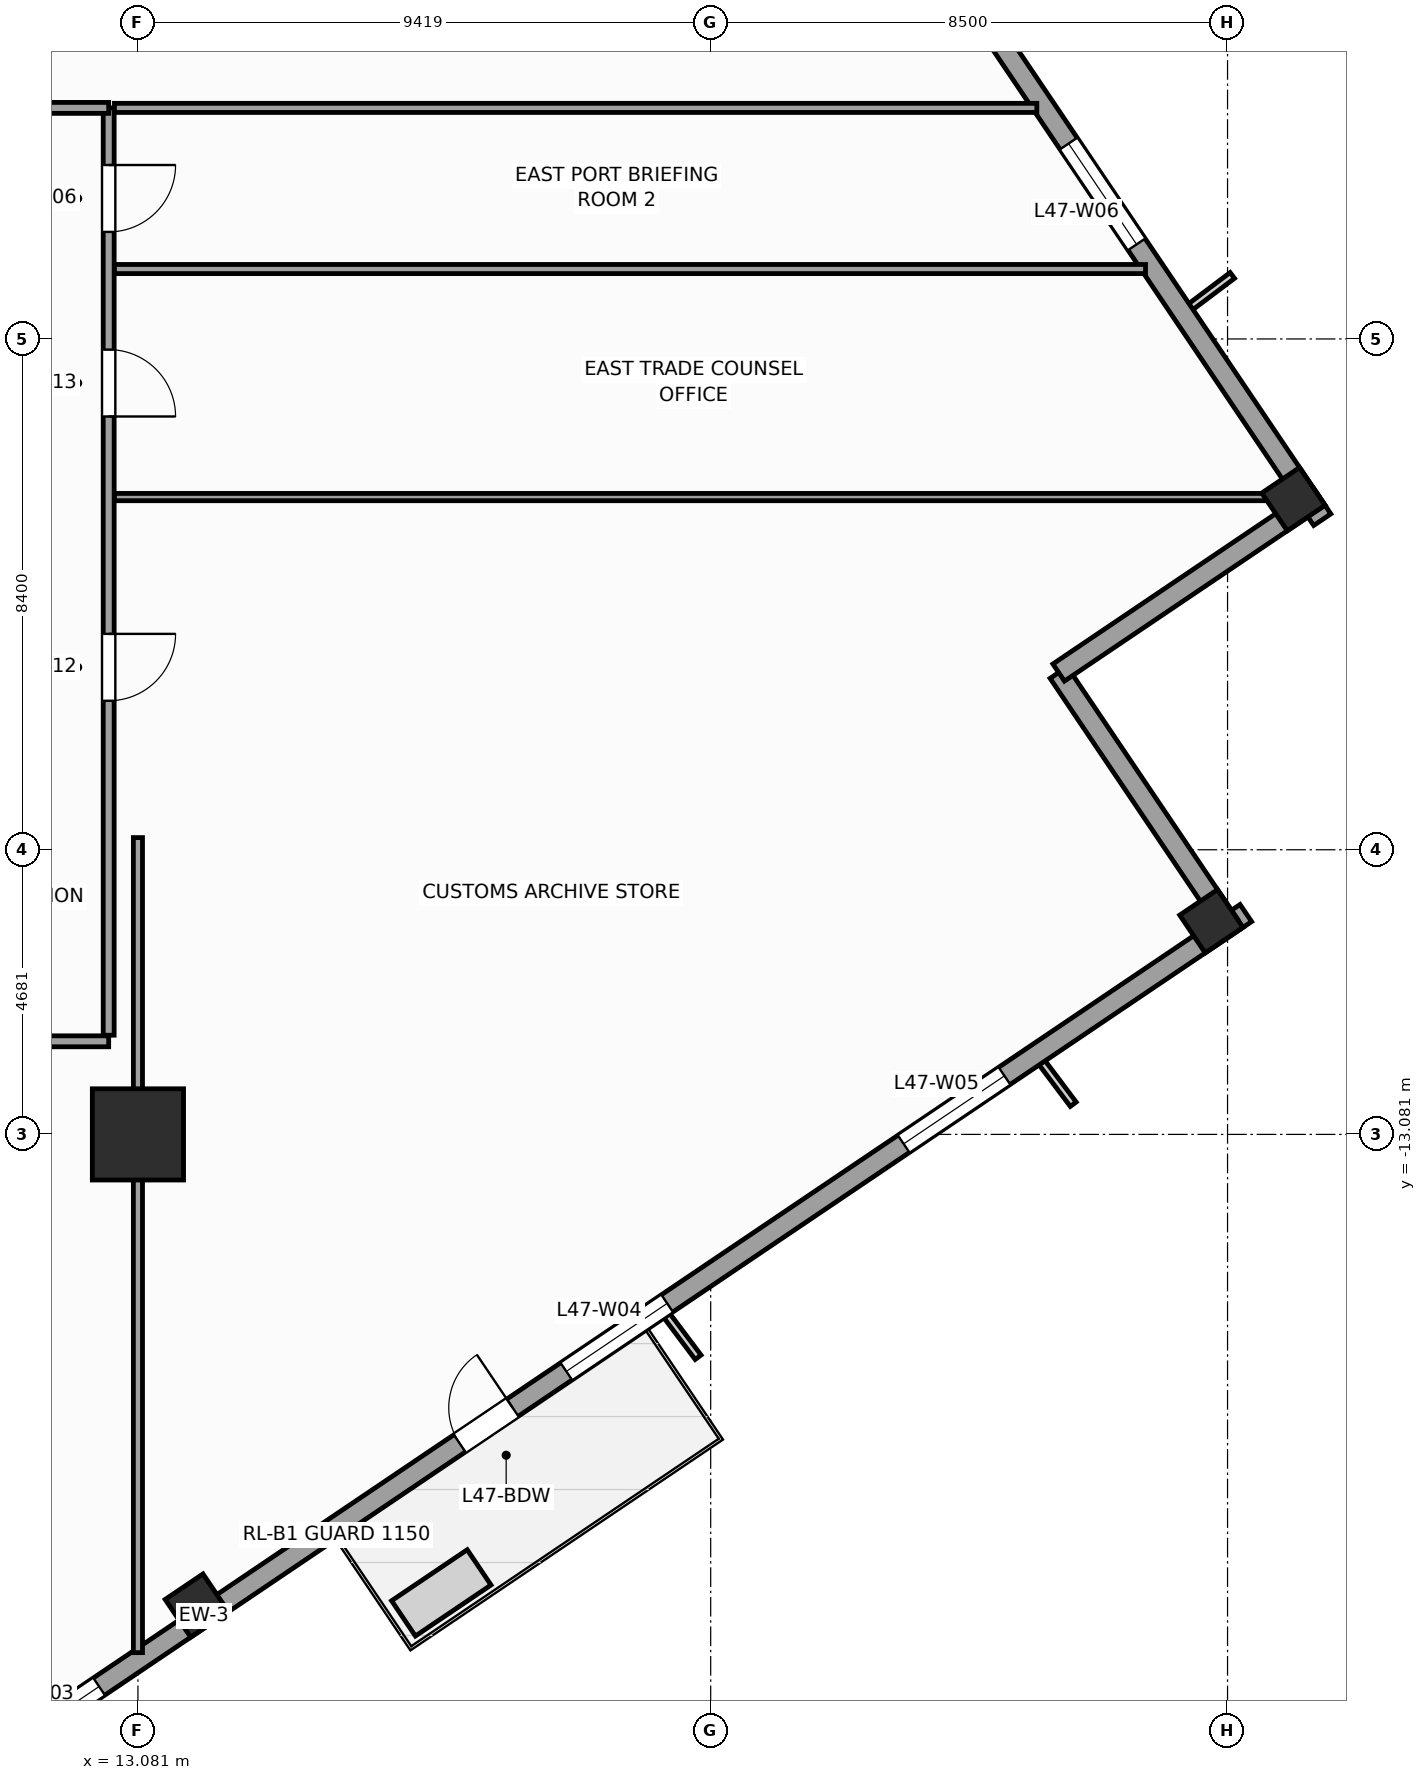
"""IFC4 building model, lengths in metres.
Left out: names, types, materials, properties, quantities, classifications, styles, units other than length and angle.
Written with IfcOpenShell. Run it as: python <this file> out.ifc"""

import sys

from ifc_helpers import new_model, si_unit, direction, frame, frame_2d, origin, origin_2d, place, context, subcontext, project, spatial, rectangle, extrude, source, transform, mapped, element, fill, save


model = new_model("IFC4")
c1 = context("Model", 3, precision=1e-05, world=origin(), true_north=direction((0.0, 1.0)))
c2 = subcontext(c1, "Body", "Model", "MODEL_VIEW")
j1 = project(units=[si_unit("LENGTHUNIT", "METRE"), si_unit("PLANEANGLEUNIT", "RADIAN")], contexts=[c1])
p1 = place(None, origin())
s1 = spatial("IfcSite", under=j1, at=p1, CompositionType="ELEMENT")
p2 = place(p1, origin())
s2 = spatial("IfcBuilding", under=s1, at=p2, CompositionType="ELEMENT")
p3 = place(p2, frame((0.0, 0.0, 196.4)))
s3 = spatial("IfcBuildingStorey", under=s2, at=p3, CompositionType="ELEMENT", Elevation=196.4)
m1 = source(origin(), c2, "Body", "SweptSolid", [
    extrude(rectangle(XDim=1.5, YDim=1.5, at=origin_2d()), origin(), (0.0, 0.0, 1.0), 4.0),
])
p4 = place(p3, frame((13.081, -13.081, 0.0), z_axis=(0.0, 0.0, 1.0), x_axis=(1.0, 0.0, 0.0)))
e1 = element("IfcColumn", 1, at=p4, inside=s3, PredefinedType="COLUMN", context=c2, shape_type="MappedRepresentation", body=[
    mapped(m1, transform((0.0, 0.0, 0.0), scale=1.0)),
])
m2 = source(origin(), c2, "Body", "SweptSolid", [
    extrude(rectangle(XDim=0.75, YDim=0.75, at=origin_2d()), origin(), (0.0, 0.0, 1.0), 4.0),
])
for number, where, z_axis, x_axis in (
    (2, (14.05, -20.83, 0.0), (0.0, 0.0, 1.0), (0.829, 0.559, 0.0)),
    (3, (30.734, -9.576, 0.0), (0.0, 0.0, 1.0), (0.829, 0.559, 0.0)),
    (4, (32.083, -2.635, 0.0), (0.0, 0.0, 1.0), (0.829, 0.559, 0.0)),
):
    element("IfcColumn", number, at=place(p3, frame(where, z_axis=z_axis, x_axis=x_axis)), inside=s3, PredefinedType="COLUMN", context=c2, shape_type="MappedRepresentation", body=[
        mapped(m2, transform((0.0, 0.0, 0.0), scale=1.0)),
    ])
p5 = place(p3, frame((-2.972, -32.558, 0.0), z_axis=(0.0, 0.0, 1.0), x_axis=(0.829036218961, 0.559194910251, 0.0)))
e5 = element("IfcWall", 5, at=p5, inside=s3, PredefinedType="STANDARD", context=c2, shape_type="SweptSolid", body=[
    extrude(rectangle(XDim=41.34, YDim=0.34, at=frame_2d((20.67, 0.0))), origin(), (0.0, 0.0, 1.0), 2.2),
])
p6 = place(p5, frame((25.745, 0.0, 0.0)))
e6 = element("IfcOpeningElement", 6, at=p6, cuts=e5, PredefinedType="OPENING", context=c2, shape_type="SweptSolid", body=[
    extrude(rectangle(XDim=1.05, YDim=2.02, at=frame_2d((0.525, 1.01))), frame((0.0, 0.18, 0.0), z_axis=(0.0, -1.0, 0.0), x_axis=(1.0, 0.0, 0.0)), (0.0, 0.0, 1.0), 0.36),
])
p7 = place(p5, frame((4.711, 0.0, 0.67)))
e7 = element("IfcOpeningElement", 7, at=p7, cuts=e5, PredefinedType="OPENING", context=c2, shape_type="SweptSolid", body=[
    extrude(rectangle(XDim=2.0, YDim=1.45, at=frame_2d((1.0, 0.725))), frame((0.0, 0.18, 0.0), z_axis=(0.0, -1.0, 0.0), x_axis=(1.0, 0.0, 0.0)), (0.0, 0.0, 1.0), 0.36),
])
p8 = place(p5, frame((10.989, 0.0, 0.67)))
e8 = element("IfcOpeningElement", 8, at=p8, cuts=e5, PredefinedType="OPENING", context=c2, shape_type="SweptSolid", body=[
    extrude(rectangle(XDim=2.0, YDim=1.45, at=frame_2d((1.0, 0.725))), frame((0.0, 0.18, 0.0), z_axis=(0.0, -1.0, 0.0), x_axis=(1.0, 0.0, 0.0)), (0.0, 0.0, 1.0), 0.36),
])
p9 = place(p5, frame((16.593, 0.0, 0.67)))
e9 = element("IfcOpeningElement", 9, at=p9, cuts=e5, PredefinedType="OPENING", context=c2, shape_type="SweptSolid", body=[
    extrude(rectangle(XDim=2.0, YDim=1.45, at=frame_2d((1.0, 0.725))), frame((0.0, 0.18, 0.0), z_axis=(0.0, -1.0, 0.0), x_axis=(1.0, 0.0, 0.0)), (0.0, 0.0, 1.0), 0.36),
])
p10 = place(p5, frame((27.861, 0.0, 0.67)))
e10 = element("IfcOpeningElement", 10, at=p10, cuts=e5, PredefinedType="OPENING", context=c2, shape_type="SweptSolid", body=[
    extrude(rectangle(XDim=2.0, YDim=1.45, at=frame_2d((1.0, 0.725))), frame((0.0, 0.18, 0.0), z_axis=(0.0, -1.0, 0.0), x_axis=(1.0, 0.0, 0.0)), (0.0, 0.0, 1.0), 0.36),
])
p11 = place(p5, frame((34.552, 0.0, 0.67)))
e11 = element("IfcOpeningElement", 11, at=p11, cuts=e5, PredefinedType="OPENING", context=c2, shape_type="SweptSolid", body=[
    extrude(rectangle(XDim=2.0, YDim=1.45, at=frame_2d((1.0, 0.725))), frame((0.0, 0.18, 0.0), z_axis=(0.0, -1.0, 0.0), x_axis=(1.0, 0.0, 0.0)), (0.0, 0.0, 1.0), 0.36),
])
p12 = place(p3, frame((31.019, -9.631, 0.0), z_axis=(0.0, 0.0, 1.0), x_axis=(-0.559210350234, 0.829025804298, 0.0)))
e12 = element("IfcWall", 12, at=p12, inside=s3, PredefinedType="STANDARD", context=c2, shape_type="SweptSolid", body=[
    extrude(rectangle(XDim=5.0, YDim=0.34, at=frame_2d((2.5, 0.0))), origin(), (0.0, 0.0, 1.0), 3.6),
])
p13 = place(p3, frame((28.223, -5.486, 0.0), z_axis=(0.0, 0.0, 1.0), x_axis=(0.82905227345, 0.559171107879, 0.0)))
e13 = element("IfcWall", 13, at=p13, inside=s3, PredefinedType="STANDARD", context=c2, shape_type="SweptSolid", body=[
    extrude(rectangle(XDim=5.17, YDim=0.34, at=frame_2d((2.585, 0.0))), origin(), (0.0, 0.0, 1.0), 2.2),
])
p14 = place(p3, frame((32.558, -2.972, 0.0), z_axis=(0.0, 0.0, 1.0), x_axis=(-0.559194910251, 0.829036218961, 0.0)))
e14 = element("IfcWall", 14, at=p14, inside=s3, PredefinedType="STANDARD", context=c2, shape_type="SweptSolid", body=[
    extrude(rectangle(XDim=41.34, YDim=0.34, at=frame_2d((20.67, 0.0))), origin(), (0.0, 0.0, 1.0), 2.2),
])
p15 = place(p14, frame((5.461, 0.0, 0.67)))
e15 = element("IfcOpeningElement", 15, at=p15, cuts=e14, PredefinedType="OPENING", context=c2, shape_type="SweptSolid", body=[
    extrude(rectangle(XDim=2.0, YDim=1.45, at=frame_2d((1.0, 0.725))), frame((0.0, 0.18, 0.0), z_axis=(0.0, -1.0, 0.0), x_axis=(1.0, 0.0, 0.0)), (0.0, 0.0, 1.0), 0.36),
])
p16 = place(p14, frame((10.989, 0.0, 0.67)))
e16 = element("IfcOpeningElement", 16, at=p16, cuts=e14, PredefinedType="OPENING", context=c2, shape_type="SweptSolid", body=[
    extrude(rectangle(XDim=2.0, YDim=1.45, at=frame_2d((1.0, 0.725))), frame((0.0, 0.18, 0.0), z_axis=(0.0, -1.0, 0.0), x_axis=(1.0, 0.0, 0.0)), (0.0, 0.0, 1.0), 0.36),
])
p17 = place(p14, frame((17.343, 0.0, 0.67)))
e17 = element("IfcOpeningElement", 17, at=p17, cuts=e14, PredefinedType="OPENING", context=c2, shape_type="SweptSolid", body=[
    extrude(rectangle(XDim=2.0, YDim=1.45, at=frame_2d((1.0, 0.725))), frame((0.0, 0.18, 0.0), z_axis=(0.0, -1.0, 0.0), x_axis=(1.0, 0.0, 0.0)), (0.0, 0.0, 1.0), 0.36),
])
p18 = place(p14, frame((27.111, 0.0, 0.67)))
e18 = element("IfcOpeningElement", 18, at=p18, cuts=e14, PredefinedType="OPENING", context=c2, shape_type="SweptSolid", body=[
    extrude(rectangle(XDim=2.0, YDim=1.45, at=frame_2d((1.0, 0.725))), frame((0.0, 0.18, 0.0), z_axis=(0.0, -1.0, 0.0), x_axis=(1.0, 0.0, 0.0)), (0.0, 0.0, 1.0), 0.36),
])
p19 = place(p14, frame((34.552, 0.0, 0.67)))
e19 = element("IfcOpeningElement", 19, at=p19, cuts=e14, PredefinedType="OPENING", context=c2, shape_type="SweptSolid", body=[
    extrude(rectangle(XDim=2.0, YDim=1.45, at=frame_2d((1.0, 0.725))), frame((0.0, 0.18, 0.0), z_axis=(0.0, -1.0, 0.0), x_axis=(1.0, 0.0, 0.0)), (0.0, 0.0, 1.0), 0.36),
])
p20 = place(p3, frame((-12.6, -11.55, 0.0), z_axis=(0.0, 0.0, 1.0), x_axis=(1.0, 0.0, 0.0)))
e20 = element("IfcWall", 20, at=p20, inside=s3, PredefinedType="PARTITIONING", context=c2, shape_type="SweptSolid", body=[
    extrude(rectangle(XDim=25.2, YDim=0.18, at=frame_2d((12.6, 0.0))), origin(), (0.0, 0.0, 1.0), 3.6),
])
p21 = place(p20, frame((3.165, 0.0, 0.0)))
e21 = element("IfcOpeningElement", 21, at=p21, cuts=e20, PredefinedType="OPENING", context=c2, shape_type="SweptSolid", body=[
    extrude(rectangle(XDim=1.1, YDim=2.2, at=frame_2d((0.55, 1.1))), frame((0.0, 0.1, 0.0), z_axis=(0.0, -1.0, 0.0), x_axis=(1.0, 0.0, 0.0)), (0.0, 0.0, 1.0), 0.2),
])
p22 = place(p20, frame((9.3, 0.0, 0.0)))
e22 = element("IfcOpeningElement", 22, at=p22, cuts=e20, PredefinedType="OPENING", context=c2, shape_type="SweptSolid", body=[
    extrude(rectangle(XDim=1.1, YDim=2.2, at=frame_2d((0.55, 1.1))), frame((0.0, 0.1, 0.0), z_axis=(0.0, -1.0, 0.0), x_axis=(1.0, 0.0, 0.0)), (0.0, 0.0, 1.0), 0.2),
])
p23 = place(p20, frame((14.8, 0.0, 0.0)))
e23 = element("IfcOpeningElement", 23, at=p23, cuts=e20, PredefinedType="OPENING", context=c2, shape_type="SweptSolid", body=[
    extrude(rectangle(XDim=1.1, YDim=2.2, at=frame_2d((0.55, 1.1))), frame((0.0, 0.1, 0.0), z_axis=(0.0, -1.0, 0.0), x_axis=(1.0, 0.0, 0.0)), (0.0, 0.0, 1.0), 0.2),
])
p24 = place(p20, frame((20.936, 0.0, 0.0)))
e24 = element("IfcOpeningElement", 24, at=p24, cuts=e20, PredefinedType="OPENING", context=c2, shape_type="SweptSolid", body=[
    extrude(rectangle(XDim=1.1, YDim=2.2, at=frame_2d((0.55, 1.1))), frame((0.0, 0.1, 0.0), z_axis=(0.0, -1.0, 0.0), x_axis=(1.0, 0.0, 0.0)), (0.0, 0.0, 1.0), 0.2),
])
p25 = place(p3, frame((12.6, -11.45, 0.0), z_axis=(0.0, 0.0, 1.0), x_axis=(0.0, 1.0, 0.0)))
e25 = element("IfcWall", 25, at=p25, inside=s3, PredefinedType="PARTITIONING", context=c2, shape_type="SweptSolid", body=[
    extrude(rectangle(XDim=15.25, YDim=0.18, at=frame_2d((7.625, 0.0))), origin(), (0.0, 0.0, 1.0), 2.56),
])
p26 = place(p25, frame((13.21, 0.0, 0.0)))
e26 = element("IfcOpeningElement", 26, at=p26, cuts=e25, PredefinedType="OPENING", context=c2, shape_type="SweptSolid", body=[
    extrude(rectangle(XDim=1.1, YDim=2.2, at=frame_2d((0.55, 1.1))), frame((0.0, 0.1, 0.0), z_axis=(0.0, -1.0, 0.0), x_axis=(1.0, 0.0, 0.0)), (0.0, 0.0, 1.0), 0.2),
])
p27 = place(p25, frame((5.5, 0.0, 0.0)))
e27 = element("IfcOpeningElement", 27, at=p27, cuts=e25, PredefinedType="OPENING", context=c2, shape_type="SweptSolid", body=[
    extrude(rectangle(XDim=1.1, YDim=2.2, at=frame_2d((0.55, 1.1))), frame((0.0, 0.1, 0.0), z_axis=(0.0, -1.0, 0.0), x_axis=(1.0, 0.0, 0.0)), (0.0, 0.0, 1.0), 0.2),
])
p28 = place(p25, frame((10.175, 0.0, 0.0)))
e28 = element("IfcOpeningElement", 28, at=p28, cuts=e25, PredefinedType="OPENING", context=c2, shape_type="SweptSolid", body=[
    extrude(rectangle(XDim=1.1, YDim=2.2, at=frame_2d((0.55, 1.1))), frame((0.0, 0.1, 0.0), z_axis=(0.0, -1.0, 0.0), x_axis=(1.0, 0.0, 0.0)), (0.0, 0.0, 1.0), 0.2),
])
p29 = place(p3, frame((8.7, 3.8, 0.0), z_axis=(0.0, 0.0, 1.0), x_axis=(1.0, 0.0, 0.0)))
e29 = element("IfcWall", 29, at=p29, inside=s3, PredefinedType="PARTITIONING", context=c2, shape_type="SweptSolid", body=[
    extrude(rectangle(XDim=3.9, YDim=0.18, at=frame_2d((1.95, 0.0))), origin(), (0.0, 0.0, 1.0), 3.6),
])
p30 = place(p29, frame((1.4, 0.0, 0.0)))
e30 = element("IfcOpeningElement", 30, at=p30, cuts=e29, PredefinedType="OPENING", context=c2, shape_type="SweptSolid", body=[
    extrude(rectangle(XDim=1.1, YDim=2.2, at=frame_2d((0.55, 1.1))), frame((0.0, 0.1, 0.0), z_axis=(0.0, -1.0, 0.0), x_axis=(1.0, 0.0, 0.0)), (0.0, 0.0, 1.0), 0.2),
])
p31 = place(p3, frame((12.695, 1.15, 0.0), z_axis=(0.0, 0.0, 1.0), x_axis=(1.0, 0.0, 0.0)))
e31 = element("IfcWall", 31, at=p31, inside=s3, PredefinedType="PARTITIONING", context=c2, shape_type="SweptSolid", body=[
    extrude(rectangle(XDim=16.956, YDim=0.15, at=frame_2d((8.478, 0.0))), origin(), (0.0, 0.0, 1.0), 3.6),
])
p32 = place(p3, frame((12.695, 3.8, 0.0), z_axis=(0.0, 0.0, 1.0), x_axis=(1.0, 0.0, 0.0)))
e32 = element("IfcWall", 32, at=p32, inside=s3, PredefinedType="PARTITIONING", context=c2, shape_type="SweptSolid", body=[
    extrude(rectangle(XDim=15.169, YDim=0.15, at=frame_2d((7.584, 0.0))), origin(), (0.0, 0.0, 1.0), 3.6),
])
p33 = place(p3, frame((13.081, -8.2, 0.0), z_axis=(0.0, 0.0, 1.0), x_axis=(0.0, -1.0, 0.0)))
e33 = element("IfcWall", 33, at=p33, inside=s3, PredefinedType="PARTITIONING", context=c2, shape_type="SweptSolid", body=[
    extrude(rectangle(XDim=13.404, YDim=0.15, at=frame_2d((6.702, 0.0))), origin(), (0.0, 0.0, 1.0), 2.2),
])
p34 = place(p3, frame((12.695, -2.6, 0.0), z_axis=(0.0, 0.0, 1.0), x_axis=(1.0, 0.0, 0.0)))
e34 = element("IfcWall", 34, at=p34, inside=s3, PredefinedType="PARTITIONING", context=c2, shape_type="SweptSolid", body=[
    extrude(rectangle(XDim=19.486, YDim=0.12, at=frame_2d((9.743, 0.0))), origin(), (0.0, 0.0, 1.0), 3.6),
])
m3 = source(origin(), c2, "Body", "SweptSolid", [
    extrude(rectangle(XDim=1.05, YDim=2.02, at=frame_2d((0.525, 1.01))), frame((0.0, 0.025, 0.0), z_axis=(0.0, -1.0, 0.0), x_axis=(1.0, 0.0, 0.0)), (0.0, 0.0, 1.0), 0.05),
])
p35 = place(p6, origin())
e35 = element("IfcDoor", 35, at=p35, inside=s3, OperationType="SINGLE_SWING_RIGHT", PredefinedType="DOOR", context=c2, shape_type="MappedRepresentation", body=[
    mapped(m3, transform((0.0, 0.0, 0.0), scale=1.0)),
])
fill(e6, e35)
m4 = source(origin(), c2, "Body", "SweptSolid", [
    extrude(rectangle(XDim=2.0, YDim=1.45, at=frame_2d((1.0, 0.725))), frame((0.0, 0.03, 0.0), z_axis=(0.0, -1.0, 0.0), x_axis=(1.0, 0.0, 0.0)), (0.0, 0.0, 1.0), 0.06),
])
p36 = place(p9, origin())
e36 = element("IfcWindow", 36, at=p36, inside=s3, PartitioningType="SINGLE_PANEL", PredefinedType="WINDOW", context=c2, shape_type="MappedRepresentation", body=[
    mapped(m4, transform((0.0, 0.0, 0.0), scale=1.0)),
])
fill(e9, e36)
p37 = place(p10, origin())
e37 = element("IfcWindow", 37, at=p37, inside=s3, PartitioningType="SINGLE_PANEL", PredefinedType="WINDOW", context=c2, shape_type="MappedRepresentation", body=[
    mapped(m4, transform((0.0, 0.0, 0.0), scale=1.0)),
])
fill(e10, e37)
p38 = place(p11, origin())
e38 = element("IfcWindow", 38, at=p38, inside=s3, PartitioningType="SINGLE_PANEL", PredefinedType="WINDOW", context=c2, shape_type="MappedRepresentation", body=[
    mapped(m4, transform((0.0, 0.0, 0.0), scale=1.0)),
])
fill(e11, e38)
p39 = place(p15, origin())
e39 = element("IfcWindow", 39, at=p39, inside=s3, PartitioningType="SINGLE_PANEL", PredefinedType="WINDOW", context=c2, shape_type="MappedRepresentation", body=[
    mapped(m4, transform((0.0, 0.0, 0.0), scale=1.0)),
])
fill(e15, e39)
m5 = source(origin(), c2, "Body", "SweptSolid", [
    extrude(rectangle(XDim=1.1, YDim=2.2, at=frame_2d((0.55, 1.1))), frame((0.0, 0.025, 0.0), z_axis=(0.0, -1.0, 0.0), x_axis=(1.0, 0.0, 0.0)), (0.0, 0.0, 1.0), 0.05),
])
p40 = place(p26, frame((1.1, 0.0, 0.0), z_axis=(0.0, 0.0, 1.0), x_axis=(-1.0, 0.0, 0.0)))
e40 = element("IfcDoor", 40, at=p40, inside=s3, OperationType="SINGLE_SWING_RIGHT", PredefinedType="DOOR", context=c2, shape_type="MappedRepresentation", body=[
    mapped(m5, transform((0.0, 0.0, 0.0), scale=1.0)),
])
fill(e26, e40)
p41 = place(p27, frame((1.1, 0.0, 0.0), z_axis=(0.0, 0.0, 1.0), x_axis=(-1.0, 0.0, 0.0)))
e41 = element("IfcDoor", 41, at=p41, inside=s3, OperationType="SINGLE_SWING_RIGHT", PredefinedType="DOOR", context=c2, shape_type="MappedRepresentation", body=[
    mapped(m5, transform((0.0, 0.0, 0.0), scale=1.0)),
])
fill(e27, e41)
p42 = place(p28, frame((1.1, 0.0, 0.0), z_axis=(0.0, 0.0, 1.0), x_axis=(-1.0, 0.0, 0.0)))
e42 = element("IfcDoor", 42, at=p42, inside=s3, OperationType="SINGLE_SWING_LEFT", PredefinedType="DOOR", context=c2, shape_type="MappedRepresentation", body=[
    mapped(m5, transform((0.0, 0.0, 0.0), scale=1.0)),
])
fill(e28, e42)
save(model, sys.argv[1])
